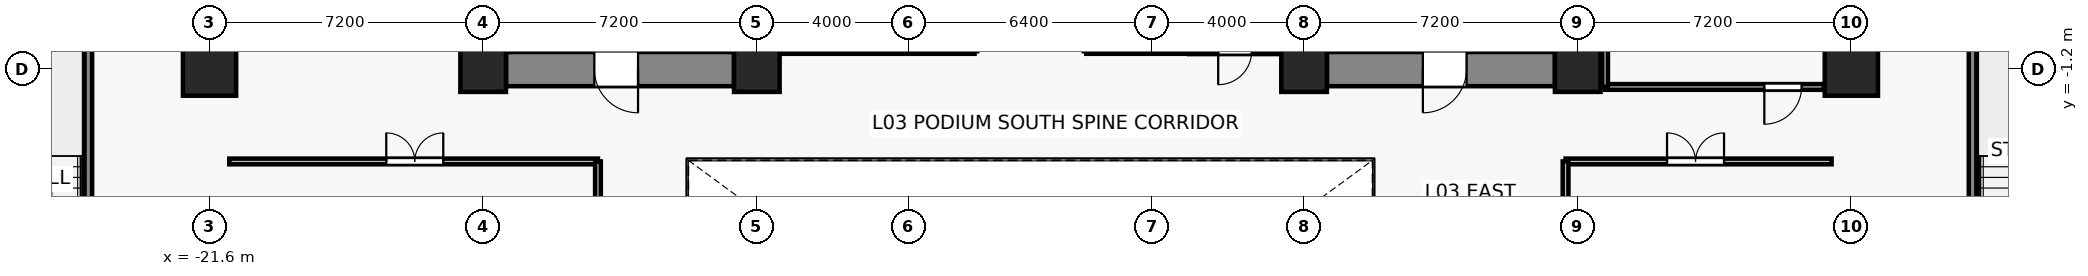
"""IFC4 building model, lengths in metres.
Left out: names, types, materials, properties, quantities, classifications, styles, units other than length and angle.
Written with IfcOpenShell. Run it as: python <this file> out.ifc"""

import sys

from ifc_helpers import new_model, si_unit, direction, frame, frame_2d, origin, origin_2d, place, context, subcontext, project, spatial, rectangle, extrude, source, transform, mapped, element, fill, save


model = new_model("IFC4")
c1 = context("Model", 3, precision=1e-05, world=origin(), true_north=direction((0.0, 1.0)))
c2 = subcontext(c1, "Body", "Model", "MODEL_VIEW")
j1 = project(units=[si_unit("LENGTHUNIT", "METRE"), si_unit("PLANEANGLEUNIT", "RADIAN")], contexts=[c1])
p1 = place(None, origin())
s1 = spatial("IfcSite", under=j1, at=p1, CompositionType="ELEMENT")
p2 = place(p1, origin())
s2 = spatial("IfcBuilding", under=s1, at=p2, CompositionType="ELEMENT")
p3 = place(p2, frame((0.0, 0.0, 13.8)))
s3 = spatial("IfcBuildingStorey", under=s2, at=p3, CompositionType="ELEMENT", Elevation=13.8)
for number, where, z_axis, x_axis in (
    (1, (-14.4, -1.2, 0.0), (0.0, 0.0, 1.0), (1.0, 0.0, 0.0)),
    (2, (-7.2, -1.2, 0.0), (0.0, 0.0, 1.0), (1.0, 0.0, 0.0)),
    (3, (7.2, -1.2, 0.0), (0.0, 0.0, 1.0), (1.0, 0.0, 0.0)),
    (4, (14.4, -1.2, 0.0), (0.0, 0.0, 1.0), (1.0, 0.0, 0.0)),
):
    element("IfcColumn", number, at=place(p3, frame(where, z_axis=z_axis, x_axis=x_axis)), inside=s3, PredefinedType="COLUMN", context=c2, shape_type="SweptSolid", body=[
        extrude(rectangle(XDim=1.2, YDim=1.2, at=origin_2d()), origin(), (0.0, 0.0, 1.0), 4.4),
    ])
for number, where, z_axis, x_axis in (
    (5, (-21.6, -1.2, 0.0), (0.0, 0.0, 1.0), (1.0, 0.0, 0.0)),
    (6, (21.6, -1.2, 0.0), (0.0, 0.0, 1.0), (1.0, 0.0, 0.0)),
):
    element("IfcColumn", number, at=place(p3, frame(where, z_axis=z_axis, x_axis=x_axis)), inside=s3, PredefinedType="COLUMN", context=c2, shape_type="SweptSolid", body=[
        extrude(rectangle(XDim=1.4, YDim=1.4, at=origin_2d()), origin(), (0.0, 0.0, 1.0), 4.4),
    ])
p4 = place(p3, frame((-7.8, -1.2, 0.0), z_axis=(0.0, 0.0, 1.0), x_axis=(-1.0, 0.0, 0.0)))
e7 = element("IfcWall", 7, at=p4, inside=s3, PredefinedType="SHEAR", context=c2, shape_type="SweptSolid", body=[
    extrude(rectangle(XDim=6.0, YDim=0.9, at=frame_2d((3.0, 0.0))), origin(), (0.0, 0.0, 1.0), 4.1),
])
p5 = place(p4, frame((2.525, 0.0, 0.0)))
e8 = element("IfcOpeningElement", 8, at=p5, cuts=e7, PredefinedType="OPENING", context=c2, shape_type="SweptSolid", body=[
    extrude(rectangle(XDim=1.15, YDim=2.15, at=frame_2d((0.575, 1.075))), frame((0.0, 0.46, 0.0), z_axis=(0.0, -1.0, 0.0), x_axis=(1.0, 0.0, 0.0)), (0.0, 0.0, 1.0), 0.92),
])
p6 = place(p3, frame((13.8, -1.2, 0.0), z_axis=(0.0, 0.0, 1.0), x_axis=(-1.0, 0.0, 0.0)))
e9 = element("IfcWall", 9, at=p6, inside=s3, PredefinedType="SHEAR", context=c2, shape_type="SweptSolid", body=[
    extrude(rectangle(XDim=6.0, YDim=0.9, at=frame_2d((3.0, 0.0))), origin(), (0.0, 0.0, 1.0), 4.1),
])
p7 = place(p6, frame((2.325, 0.0, 0.0)))
e10 = element("IfcOpeningElement", 10, at=p7, cuts=e9, PredefinedType="OPENING", context=c2, shape_type="SweptSolid", body=[
    extrude(rectangle(XDim=1.15, YDim=2.15, at=frame_2d((0.575, 1.075))), frame((0.0, 0.46, 0.0), z_axis=(0.0, -1.0, 0.0), x_axis=(1.0, 0.0, 0.0)), (0.0, 0.0, 1.0), 0.92),
])
p8 = place(p3, frame((-1.47, -0.73, 0.0), z_axis=(0.0, 0.0, 1.0), x_axis=(-1.0, 0.0, 0.0)))
e11 = element("IfcWall", 11, at=p8, inside=s3, PredefinedType="PARTITIONING", context=c2, shape_type="SweptSolid", body=[
    extrude(rectangle(XDim=5.11, YDim=0.135, at=frame_2d((2.555, 0.0))), origin(), (0.0, 0.0, 1.0), 4.1),
])
p9 = place(p3, frame((4.18, -0.73, 0.0), z_axis=(0.0, 0.0, 1.0), x_axis=(-1.0, 0.0, 0.0)))
e12 = element("IfcWall", 12, at=p9, inside=s3, PredefinedType="PARTITIONING", context=c2, shape_type="SweptSolid", body=[
    extrude(rectangle(XDim=2.71, YDim=0.135, at=frame_2d((1.355, 0.0))), origin(), (0.0, 0.0, 1.0), 4.1),
])
p10 = place(p3, frame((6.58, -0.73, 0.0), z_axis=(0.0, 0.0, 1.0), x_axis=(-1.0, 0.0, 0.0)))
e13 = element("IfcWall", 13, at=p10, inside=s3, PredefinedType="PARTITIONING", context=c2, shape_type="SweptSolid", body=[
    extrude(rectangle(XDim=2.4, YDim=0.15, at=frame_2d((1.2, 0.0))), origin(), (0.0, 0.0, 1.0), 4.1),
])
p11 = place(p10, frame((0.76, 0.0, 0.0)))
e14 = element("IfcOpeningElement", 14, at=p11, cuts=e13, PredefinedType="OPENING", context=c2, shape_type="SweptSolid", body=[
    extrude(rectangle(XDim=0.88, YDim=2.1, at=frame_2d((0.44, 1.05))), frame((0.0, 0.085, 0.0), z_axis=(0.0, -1.0, 0.0), x_axis=(1.0, 0.0, 0.0)), (0.0, 0.0, 1.0), 0.17),
])
for number, where, z_axis, x_axis in (
    (15, (-24.79, 0.16, 0.0), (0.0, 0.0, 1.0), (0.0, -1.0, 0.0)),
    (16, (24.79, -8.76, 0.0), (0.0, 0.0, 1.0), (0.0, 1.0, 0.0)),
):
    element("IfcWall", number, at=place(p3, frame(where, z_axis=z_axis, x_axis=x_axis)), inside=s3, PredefinedType="SOLIDWALL", context=c2, shape_type="SweptSolid", body=[
        extrude(rectangle(XDim=8.92, YDim=0.2, at=frame_2d((4.46, 0.0))), origin(), (0.0, 0.0, 1.0), 4.1),
    ])
p12 = place(p3, frame((-21.08, -3.63, 0.0), z_axis=(0.0, 0.0, 1.0), x_axis=(1.0, 0.0, 0.0)))
e17 = element("IfcWall", 17, at=p12, inside=s3, PredefinedType="PARTITIONING", context=c2, shape_type="SweptSolid", body=[
    extrude(rectangle(XDim=9.7, YDim=0.15, at=frame_2d((4.85, 0.0))), origin(), (0.0, 0.0, 1.0), 3.239),
])
p13 = place(p12, frame((4.13, 0.0, 0.0)))
e18 = element("IfcOpeningElement", 18, at=p13, cuts=e17, PredefinedType="OPENING", context=c2, shape_type="SweptSolid", body=[
    extrude(rectangle(XDim=1.5, YDim=2.2, at=frame_2d((0.75, 1.1))), frame((0.0, 0.085, 0.0), z_axis=(0.0, -1.0, 0.0), x_axis=(1.0, 0.0, 0.0)), (0.0, 0.0, 1.0), 0.17),
])
p14 = place(p3, frame((-11.38, -3.63, 0.0), z_axis=(0.0, 0.0, 1.0), x_axis=(0.0, -1.0, 0.0)))
e19 = element("IfcWall", 19, at=p14, inside=s3, PredefinedType="PARTITIONING", context=c2, shape_type="SweptSolid", body=[
    extrude(rectangle(XDim=16.65, YDim=0.15, at=frame_2d((8.325, 0.0))), origin(), (0.0, 0.0, 1.0), 3.19),
])
p15 = place(p3, frame((14.08, -3.63, 0.0), z_axis=(0.0, 0.0, 1.0), x_axis=(1.0, 0.0, 0.0)))
e20 = element("IfcWall", 20, at=p15, inside=s3, PredefinedType="PARTITIONING", context=c2, shape_type="SweptSolid", body=[
    extrude(rectangle(XDim=7.0, YDim=0.15, at=frame_2d((3.5, 0.0))), origin(), (0.0, 0.0, 1.0), 3.239),
])
p16 = place(p15, frame((2.67, 0.0, 0.0)))
e21 = element("IfcOpeningElement", 21, at=p16, cuts=e20, PredefinedType="OPENING", context=c2, shape_type="SweptSolid", body=[
    extrude(rectangle(XDim=1.5, YDim=2.2, at=frame_2d((0.75, 1.1))), frame((0.0, 0.085, 0.0), z_axis=(0.0, -1.0, 0.0), x_axis=(1.0, 0.0, 0.0)), (0.0, 0.0, 1.0), 0.17),
])
p17 = place(p3, frame((14.08, -7.05, 0.0), z_axis=(0.0, 0.0, 1.0), x_axis=(0.0, 1.0, 0.0)))
e22 = element("IfcWall", 22, at=p17, inside=s3, PredefinedType="PARTITIONING", context=c2, shape_type="SweptSolid", body=[
    extrude(rectangle(XDim=3.42, YDim=0.15, at=frame_2d((1.71, 0.0))), origin(), (0.0, 0.0, 1.0), 3.29),
])
p18 = place(p3, frame((20.88, -1.67, 0.0), z_axis=(0.0, 0.0, 1.0), x_axis=(-1.0, 0.0, 0.0)))
e23 = element("IfcWall", 23, at=p18, inside=s3, PredefinedType="PARTITIONING", context=c2, shape_type="SweptSolid", body=[
    extrude(rectangle(XDim=5.76, YDim=0.15, at=frame_2d((2.88, 0.0))), origin(), (0.0, 0.0, 1.0), 4.1),
])
p19 = place(p18, frame((0.59, 0.0, 0.0)))
e24 = element("IfcOpeningElement", 24, at=p19, cuts=e23, PredefinedType="OPENING", context=c2, shape_type="SweptSolid", body=[
    extrude(rectangle(XDim=0.98, YDim=2.15, at=frame_2d((0.49, 1.075))), frame((0.0, 0.085, 0.0), z_axis=(0.0, -1.0, 0.0), x_axis=(1.0, 0.0, 0.0)), (0.0, 0.0, 1.0), 0.17),
])
p20 = place(p3, frame((15.12, -1.67, 0.0), z_axis=(0.0, 0.0, 1.0), x_axis=(0.0, 1.0, 0.0)))
e25 = element("IfcWall", 25, at=p20, inside=s3, PredefinedType="PARTITIONING", context=c2, shape_type="SweptSolid", body=[
    extrude(rectangle(XDim=8.15, YDim=0.15, at=frame_2d((4.075, 0.0))), origin(), (0.0, 0.0, 1.0), 3.19),
])
m1 = source(origin(), c2, "Body", "SweptSolid", [
    extrude(rectangle(XDim=1.15, YDim=2.15, at=frame_2d((0.575, 1.075))), frame((0.0, 0.025, 0.0), z_axis=(0.0, -1.0, 0.0), x_axis=(1.0, 0.0, 0.0)), (0.0, 0.0, 1.0), 0.05),
])
p21 = place(p5, origin())
e26 = element("IfcDoor", 26, at=p21, inside=s3, OperationType="SINGLE_SWING_LEFT", PredefinedType="DOOR", context=c2, shape_type="MappedRepresentation", body=[
    mapped(m1, transform((0.0, 0.0, 0.0), x_axis=(1.0, 0.0, 0.0), y_axis=(0.0, 1.0, 0.0), z_axis=(0.0, 0.0, 1.0), scale=1.0)),
])
fill(e8, e26)
p22 = place(p7, origin())
e27 = element("IfcDoor", 27, at=p22, inside=s3, OperationType="SINGLE_SWING_RIGHT", PredefinedType="DOOR", context=c2, shape_type="MappedRepresentation", body=[
    mapped(m1, transform((0.0, 0.0, 0.0), x_axis=(1.0, 0.0, 0.0), y_axis=(0.0, 1.0, 0.0), z_axis=(0.0, 0.0, 1.0), scale=1.0)),
])
fill(e10, e27)
m2 = source(origin(), c2, "Body", "SweptSolid", [
    extrude(rectangle(XDim=0.88, YDim=2.1, at=frame_2d((0.44, 1.05))), frame((0.0, 0.025, 0.0), z_axis=(0.0, -1.0, 0.0), x_axis=(1.0, 0.0, 0.0)), (0.0, 0.0, 1.0), 0.05),
])
p23 = place(p11, origin())
e28 = element("IfcDoor", 28, at=p23, inside=s3, OperationType="SINGLE_SWING_RIGHT", PredefinedType="DOOR", context=c2, shape_type="MappedRepresentation", body=[
    mapped(m2, transform((0.0, 0.0, 0.0), x_axis=(1.0, 0.0, 0.0), y_axis=(0.0, 1.0, 0.0), z_axis=(0.0, 0.0, 1.0), scale=1.0)),
])
fill(e14, e28)
m3 = source(origin(), c2, "Body", "SweptSolid", [
    extrude(rectangle(XDim=1.5, YDim=2.2, at=frame_2d((0.75, 1.1))), frame((0.0, 0.025, 0.0), z_axis=(0.0, -1.0, 0.0), x_axis=(1.0, 0.0, 0.0)), (0.0, 0.0, 1.0), 0.05),
])
p24 = place(p13, origin())
e29 = element("IfcDoor", 29, at=p24, inside=s3, OperationType="DOUBLE_DOOR_SINGLE_SWING", PredefinedType="DOOR", context=c2, shape_type="MappedRepresentation", body=[
    mapped(m3, transform((0.0, 0.0, 0.0), x_axis=(1.0, 0.0, 0.0), y_axis=(0.0, 1.0, 0.0), z_axis=(0.0, 0.0, 1.0), scale=1.0)),
])
fill(e18, e29)
p25 = place(p16, origin())
e30 = element("IfcDoor", 30, at=p25, inside=s3, OperationType="DOUBLE_DOOR_SINGLE_SWING", PredefinedType="DOOR", context=c2, shape_type="MappedRepresentation", body=[
    mapped(m3, transform((0.0, 0.0, 0.0), x_axis=(1.0, 0.0, 0.0), y_axis=(0.0, 1.0, 0.0), z_axis=(0.0, 0.0, 1.0), scale=1.0)),
])
fill(e21, e30)
m4 = source(origin(), c2, "Body", "SweptSolid", [
    extrude(rectangle(XDim=0.98, YDim=2.15, at=frame_2d((0.49, 1.075))), frame((0.0, 0.025, 0.0), z_axis=(0.0, -1.0, 0.0), x_axis=(1.0, 0.0, 0.0)), (0.0, 0.0, 1.0), 0.05),
])
p26 = place(p19, origin())
e31 = element("IfcDoor", 31, at=p26, inside=s3, OperationType="SINGLE_SWING_RIGHT", PredefinedType="DOOR", context=c2, shape_type="MappedRepresentation", body=[
    mapped(m4, transform((0.0, 0.0, 0.0), x_axis=(1.0, 0.0, 0.0), y_axis=(0.0, 1.0, 0.0), z_axis=(0.0, 0.0, 1.0), scale=1.0)),
])
fill(e24, e31)
save(model, sys.argv[1])
